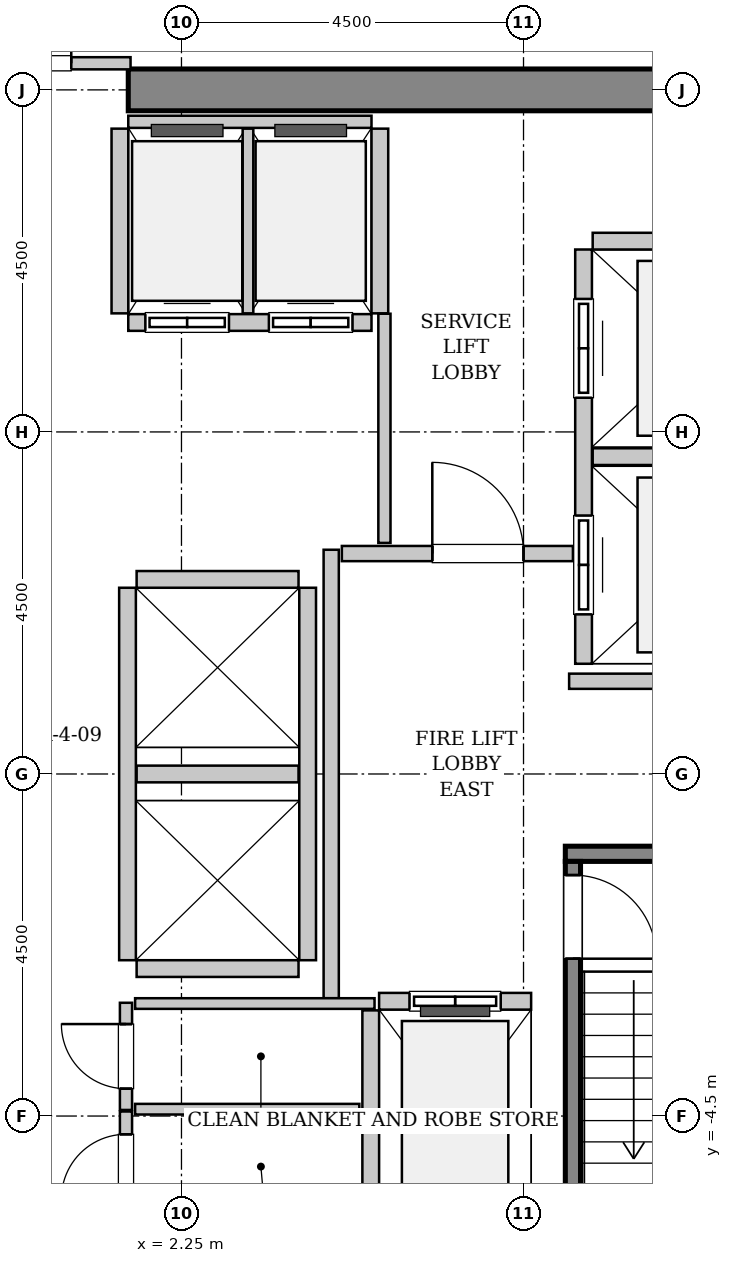
"""IFC4 building model, lengths in metres.
Left out: names, types, materials, properties, quantities, classifications, styles, units other than length and angle.
Written with IfcOpenShell. Run it as: python <this file> out.ifc"""

import sys

from ifc_helpers import new_model, si_unit, direction, frame, frame_2d, origin, place, context, subcontext, project, spatial, rectangle, extrude, source, transform, mapped, element, fill, save


model = new_model("IFC4")
c1 = context("Model", 3, precision=1e-05, world=origin(), true_north=direction((0.0, 1.0)))
c2 = subcontext(c1, "Body", "Model", "MODEL_VIEW")
j1 = project(units=[si_unit("LENGTHUNIT", "METRE"), si_unit("PLANEANGLEUNIT", "RADIAN")], contexts=[c1])
p1 = place(None, origin())
s1 = spatial("IfcSite", under=j1, at=p1, CompositionType="ELEMENT")
p2 = place(p1, origin())
s2 = spatial("IfcBuilding", under=s1, at=p2, CompositionType="ELEMENT")
p3 = place(p2, frame((0.0, 0.0, 136.4)))
s3 = spatial("IfcBuildingStorey", under=s2, at=p3, CompositionType="ELEMENT", Elevation=136.4)
m1 = source(origin(), c2, "Body", "SweptSolid", [
    extrude(rectangle(XDim=9.975, YDim=0.55, at=frame_2d((4.987, 0.0))), origin(), (0.0, 0.0, 1.0), 3.8),
])
p4 = place(p3, frame((1.55, 9.0, 0.0), z_axis=(0.0, 0.0, 1.0), x_axis=(1.0, 0.0, 0.0)))
e1 = element("IfcWall", 1, at=p4, inside=s3, PredefinedType="SHEAR", context=c2, shape_type="MappedRepresentation", body=[
    mapped(m1, transform((0.0, 0.0, 0.0), x_axis=(1.0, 0.0, 0.0), y_axis=(0.0, 1.0, 0.0), z_axis=(0.0, 0.0, 1.0), scale=1.0)),
])
m2 = source(origin(), c2, "Body", "SweptSolid", [
    extrude(rectangle(XDim=3.4, YDim=0.2, at=frame_2d((1.7, 0.0))), origin(), (0.0, 0.0, 1.0), 3.8),
])
p5 = place(p3, frame((7.3, -1.05, 0.0), z_axis=(0.0, 0.0, 1.0), x_axis=(1.0, 0.0, 0.0)))
e2 = element("IfcWall", 2, at=p5, inside=s3, PredefinedType="SOLIDWALL", context=c2, shape_type="MappedRepresentation", body=[
    mapped(m2, transform((0.0, 0.0, 0.0), x_axis=(1.0, 0.0, 0.0), y_axis=(0.0, 1.0, 0.0), z_axis=(0.0, 0.0, 1.0), scale=1.0)),
])
m3 = source(origin(), c2, "Body", "SweptSolid", [
    extrude(rectangle(XDim=7.1, YDim=0.2, at=frame_2d((3.55, 0.0))), origin(), (0.0, 0.0, 1.0), 3.8),
])
p6 = place(p3, frame((7.4, -1.15, 0.0), z_axis=(0.0, 0.0, 1.0), x_axis=(0.0, -1.0, 0.0)))
e3 = element("IfcWall", 3, at=p6, inside=s3, PredefinedType="SOLIDWALL", context=c2, shape_type="MappedRepresentation", body=[
    mapped(m3, transform((0.0, 0.0, 0.0), x_axis=(1.0, 0.0, 0.0), y_axis=(0.0, 1.0, 0.0), z_axis=(0.0, 0.0, 1.0), scale=1.0)),
])
p7 = place(p6, frame((0.18, 0.0, 0.0)))
e4 = element("IfcOpeningElement", 4, at=p7, cuts=e3, PredefinedType="OPENING", context=c2, shape_type="SweptSolid", body=[
    extrude(rectangle(XDim=1.1, YDim=2.15, at=frame_2d((0.55, 1.075))), frame((0.0, 0.11, 0.0), z_axis=(0.0, -1.0, 0.0), x_axis=(1.0, 0.0, 0.0)), (0.0, 0.0, 1.0), 0.22),
])
m4 = source(origin(), c2, "Body", "SweptSolid", [
    extrude(rectangle(XDim=2.0, YDim=0.22, at=frame_2d((1.0, 0.0))), origin(), (0.0, 0.0, 1.0), 3.535),
])
p8 = place(p3, frame((6.85, -2.99, 0.0), z_axis=(0.0, 0.0, 1.0), x_axis=(-1.0, 0.0, 0.0)))
e5 = element("IfcWall", 5, at=p8, inside=s3, PredefinedType="SOLIDWALL", context=c2, shape_type="MappedRepresentation", body=[
    mapped(m4, transform((0.0, 0.0, 0.0), x_axis=(1.0, 0.0, 0.0), y_axis=(0.0, 1.0, 0.0), z_axis=(0.0, 0.0, 1.0), scale=1.0)),
])
p9 = place(p8, frame((0.4, 0.0, 0.0)))
e6 = element("IfcOpeningElement", 6, at=p9, cuts=e5, PredefinedType="OPENING", context=c2, shape_type="SweptSolid", body=[
    extrude(rectangle(XDim=1.2, YDim=2.2, at=frame_2d((0.6, 1.1))), frame((0.0, 0.12, 0.0), z_axis=(0.0, -1.0, 0.0), x_axis=(1.0, 0.0, 0.0)), (0.0, 0.0, 1.0), 0.24),
])
m5 = source(origin(), c2, "Body", "SweptSolid", [
    extrude(rectangle(XDim=2.68, YDim=0.22, at=frame_2d((1.34, 0.0))), origin(), (0.0, 0.0, 1.0), 3.535),
])
p10 = place(p3, frame((4.74, -3.11, 0.0), z_axis=(0.0, 0.0, 1.0), x_axis=(0.0, -1.0, 0.0)))
e7 = element("IfcWall", 7, at=p10, inside=s3, PredefinedType="SOLIDWALL", context=c2, shape_type="MappedRepresentation", body=[
    mapped(m5, transform((0.0, 0.0, 0.0), x_axis=(1.0, 0.0, 0.0), y_axis=(0.0, 1.0, 0.0), z_axis=(0.0, 0.0, 1.0), scale=1.0)),
])
m6 = source(origin(), c2, "Body", "SweptSolid", [
    extrude(rectangle(XDim=5.45, YDim=0.22, at=frame_2d((2.725, 0.0))), origin(), (0.0, 0.0, 1.0), 3.535),
])
p11 = place(p3, frame((7.54, 6.9, 0.0), z_axis=(0.0, 0.0, 1.0), x_axis=(0.0, -1.0, 0.0)))
e8 = element("IfcWall", 8, at=p11, inside=s3, PredefinedType="SOLIDWALL", context=c2, shape_type="MappedRepresentation", body=[
    mapped(m6, transform((0.0, 0.0, 0.0), x_axis=(1.0, 0.0, 0.0), y_axis=(0.0, 1.0, 0.0), z_axis=(0.0, 0.0, 1.0), scale=1.0)),
])
p12 = place(p11, frame((3.5, 0.0, 0.0)))
e9 = element("IfcOpeningElement", 9, at=p12, cuts=e8, PredefinedType="OPENING", context=c2, shape_type="SweptSolid", body=[
    extrude(rectangle(XDim=1.3, YDim=2.3, at=frame_2d((0.65, 1.15))), frame((0.0, 0.12, 0.0), z_axis=(0.0, -1.0, 0.0), x_axis=(1.0, 0.0, 0.0)), (0.0, 0.0, 1.0), 0.24),
])
p13 = place(p11, frame((0.65, 0.0, 0.0)))
e10 = element("IfcOpeningElement", 10, at=p13, cuts=e8, PredefinedType="OPENING", context=c2, shape_type="SweptSolid", body=[
    extrude(rectangle(XDim=1.3, YDim=2.3, at=frame_2d((0.65, 1.15))), frame((0.0, 0.12, 0.0), z_axis=(0.0, -1.0, 0.0), x_axis=(1.0, 0.0, 0.0)), (0.0, 0.0, 1.0), 0.24),
])
m7 = source(origin(), c2, "Body", "SweptSolid", [
    extrude(rectangle(XDim=2.78, YDim=0.22, at=frame_2d((1.39, 0.0))), origin(), (0.0, 0.0, 1.0), 3.535),
])
for number, where, z_axis, x_axis in (
    (11, (7.66, 4.175, 0.0), (0.0, 0.0, 1.0), (1.0, 0.0, 0.0)),
    (12, (10.44, 7.01, 0.0), (0.0, 0.0, 1.0), (-1.0, 0.0, 0.0)),
):
    element("IfcWall", number, at=place(p3, frame(where, z_axis=z_axis, x_axis=x_axis)), inside=s3, PredefinedType="SOLIDWALL", context=c2, shape_type="MappedRepresentation", body=[
        mapped(m7, transform((0.0, 0.0, 0.0), x_axis=(1.0, 0.0, 0.0), y_axis=(0.0, 1.0, 0.0), z_axis=(0.0, 0.0, 1.0), scale=1.0)),
    ])
m8 = source(origin(), c2, "Body", "SweptSolid", [
    extrude(rectangle(XDim=3.2, YDim=0.22, at=frame_2d((1.6, 0.0))), origin(), (0.0, 0.0, 1.0), 3.535),
])
p14 = place(p3, frame((1.55, 5.94, 0.0), z_axis=(0.0, 0.0, 1.0), x_axis=(1.0, 0.0, 0.0)))
e13 = element("IfcWall", 13, at=p14, inside=s3, PredefinedType="SOLIDWALL", context=c2, shape_type="MappedRepresentation", body=[
    mapped(m8, transform((0.0, 0.0, 0.0), x_axis=(1.0, 0.0, 0.0), y_axis=(0.0, 1.0, 0.0), z_axis=(0.0, 0.0, 1.0), scale=1.0)),
])
p15 = place(p14, frame((0.225, 0.0, 0.0)))
e14 = element("IfcOpeningElement", 14, at=p15, cuts=e13, PredefinedType="OPENING", context=c2, shape_type="SweptSolid", body=[
    extrude(rectangle(XDim=1.1, YDim=2.2, at=frame_2d((0.55, 1.1))), frame((0.0, 0.12, 0.0), z_axis=(0.0, -1.0, 0.0), x_axis=(1.0, 0.0, 0.0)), (0.0, 0.0, 1.0), 0.24),
])
p16 = place(p14, frame((1.85, 0.0, 0.0)))
e15 = element("IfcOpeningElement", 15, at=p16, cuts=e13, PredefinedType="OPENING", context=c2, shape_type="SweptSolid", body=[
    extrude(rectangle(XDim=1.1, YDim=2.2, at=frame_2d((0.55, 1.1))), frame((0.0, 0.12, 0.0), z_axis=(0.0, -1.0, 0.0), x_axis=(1.0, 0.0, 0.0)), (0.0, 0.0, 1.0), 0.24),
])
m9 = source(origin(), c2, "Body", "SweptSolid", [
    extrude(rectangle(XDim=3.2, YDim=0.16, at=frame_2d((1.6, 0.0))), origin(), (0.0, 0.0, 1.0), 2.425),
])
p17 = place(p3, frame((4.75, 8.58, 0.0), z_axis=(0.0, 0.0, 1.0), x_axis=(-1.0, 0.0, 0.0)))
e16 = element("IfcWall", 16, at=p17, inside=s3, PredefinedType="PARTITIONING", context=c2, shape_type="MappedRepresentation", body=[
    mapped(m9, transform((0.0, 0.0, 0.0), x_axis=(1.0, 0.0, 0.0), y_axis=(0.0, 1.0, 0.0), z_axis=(0.0, 0.0, 1.0), scale=1.0)),
])
m10 = source(origin(), c2, "Body", "SweptSolid", [
    extrude(rectangle(XDim=2.43, YDim=0.22, at=frame_2d((1.215, 0.0))), origin(), (0.0, 0.0, 1.0), 3.535),
])
p18 = place(p3, frame((1.44, 8.49, 0.0), z_axis=(0.0, 0.0, 1.0), x_axis=(0.0, -1.0, 0.0)))
e17 = element("IfcWall", 17, at=p18, inside=s3, PredefinedType="SOLIDWALL", context=c2, shape_type="MappedRepresentation", body=[
    mapped(m10, transform((0.0, 0.0, 0.0), x_axis=(1.0, 0.0, 0.0), y_axis=(0.0, 1.0, 0.0), z_axis=(0.0, 0.0, 1.0), scale=1.0)),
])
m11 = source(origin(), c2, "Body", "SweptSolid", [
    extrude(rectangle(XDim=2.43, YDim=0.14, at=frame_2d((1.215, 0.0))), origin(), (0.0, 0.0, 1.0), 3.535),
])
p19 = place(p3, frame((3.125, 6.06, 0.0), z_axis=(0.0, 0.0, 1.0), x_axis=(0.0, 1.0, 0.0)))
e18 = element("IfcWall", 18, at=p19, inside=s3, PredefinedType="PARTITIONING", context=c2, shape_type="MappedRepresentation", body=[
    mapped(m11, transform((0.0, 0.0, 0.0), x_axis=(1.0, 0.0, 0.0), y_axis=(0.0, 1.0, 0.0), z_axis=(0.0, 0.0, 1.0), scale=1.0)),
])
p20 = place(p3, frame((4.86, 6.06, 0.0), z_axis=(0.0, 0.0, 1.0), x_axis=(0.0, 1.0, 0.0)))
e19 = element("IfcWall", 19, at=p20, inside=s3, PredefinedType="SOLIDWALL", context=c2, shape_type="MappedRepresentation", body=[
    mapped(m10, transform((0.0, 0.0, 0.0), x_axis=(1.0, 0.0, 0.0), y_axis=(0.0, 1.0, 0.0), z_axis=(0.0, 0.0, 1.0), scale=1.0)),
])
m12 = source(origin(), c2, "Body", "SweptSolid", [
    extrude(rectangle(XDim=4.9, YDim=0.22, at=frame_2d((2.45, 0.0))), origin(), (0.0, 0.0, 1.0), 3.535),
])
for number, where, z_axis, x_axis in (
    (20, (1.54, 2.45, 0.0), (0.0, 0.0, 1.0), (0.0, -1.0, 0.0)),
    (21, (3.91, -2.45, 0.0), (0.0, 0.0, 1.0), (0.0, 1.0, 0.0)),
):
    element("IfcWall", number, at=place(p3, frame(where, z_axis=z_axis, x_axis=x_axis)), inside=s3, PredefinedType="SOLIDWALL", context=c2, shape_type="MappedRepresentation", body=[
        mapped(m12, transform((0.0, 0.0, 0.0), x_axis=(1.0, 0.0, 0.0), y_axis=(0.0, 1.0, 0.0), z_axis=(0.0, 0.0, 1.0), scale=1.0)),
    ])
m13 = source(origin(), c2, "Body", "SweptSolid", [
    extrude(rectangle(XDim=2.13, YDim=0.22, at=frame_2d((1.065, 0.0))), origin(), (0.0, 0.0, 1.0), 3.535),
])
for number, where, z_axis, x_axis in (
    (22, (1.66, -2.56, 0.0), (0.0, 0.0, 1.0), (1.0, 0.0, 0.0)),
    (23, (1.66, 0.0, 0.0), (0.0, 0.0, 1.0), (1.0, 0.0, 0.0)),
    (24, (3.79, 2.56, 0.0), (0.0, 0.0, 1.0), (-1.0, 0.0, 0.0)),
):
    element("IfcWall", number, at=place(p3, frame(where, z_axis=z_axis, x_axis=x_axis)), inside=s3, PredefinedType="SOLIDWALL", context=c2, shape_type="MappedRepresentation", body=[
        mapped(m13, transform((0.0, 0.0, 0.0), x_axis=(1.0, 0.0, 0.0), y_axis=(0.0, 1.0, 0.0), z_axis=(0.0, 0.0, 1.0), scale=1.0)),
    ])
m14 = source(origin(), c2, "Body", "SweptSolid", [
    extrude(rectangle(XDim=5.9, YDim=0.2, at=frame_2d((2.95, 0.0))), origin(), (0.0, 0.0, 1.0), 3.535),
])
p21 = place(p3, frame((4.22, -2.95, 0.0), z_axis=(0.0, 0.0, 1.0), x_axis=(0.0, 1.0, 0.0)))
e25 = element("IfcWall", 25, at=p21, inside=s3, PredefinedType="PARTITIONING", context=c2, shape_type="MappedRepresentation", body=[
    mapped(m14, transform((0.0, 0.0, 0.0), x_axis=(1.0, 0.0, 0.0), y_axis=(0.0, 1.0, 0.0), z_axis=(0.0, 0.0, 1.0), scale=1.0)),
])
m15 = source(origin(), c2, "Body", "SweptSolid", [
    extrude(rectangle(XDim=3.04, YDim=0.2, at=frame_2d((1.52, 0.0))), origin(), (0.0, 0.0, 1.0), 3.535),
])
p22 = place(p3, frame((4.36, 2.9, 0.0), z_axis=(0.0, 0.0, 1.0), x_axis=(1.0, 0.0, 0.0)))
e26 = element("IfcWall", 26, at=p22, inside=s3, PredefinedType="PARTITIONING", context=c2, shape_type="MappedRepresentation", body=[
    mapped(m15, transform((0.0, 0.0, 0.0), x_axis=(1.0, 0.0, 0.0), y_axis=(0.0, 1.0, 0.0), z_axis=(0.0, 0.0, 1.0), scale=1.0)),
])
p23 = place(p22, frame((1.19, 0.0, 0.0)))
e27 = element("IfcOpeningElement", 27, at=p23, cuts=e26, PredefinedType="OPENING", context=c2, shape_type="SweptSolid", body=[
    extrude(rectangle(XDim=1.2, YDim=2.15, at=frame_2d((0.6, 1.075))), frame((0.0, 0.11, 0.0), z_axis=(0.0, -1.0, 0.0), x_axis=(1.0, 0.0, 0.0)), (0.0, 0.0, 1.0), 0.22),
])
m16 = source(origin(), c2, "Body", "SweptSolid", [
    extrude(rectangle(XDim=4.11, YDim=0.2, at=frame_2d((2.055, 0.0))), origin(), (0.0, 0.0, 1.0), 3.535),
])
p24 = place(p3, frame((7.35, 1.22, 0.0), z_axis=(0.0, 0.0, 1.0), x_axis=(1.0, 0.0, 0.0)))
e28 = element("IfcWall", 28, at=p24, inside=s3, PredefinedType="PARTITIONING", context=c2, shape_type="MappedRepresentation", body=[
    mapped(m16, transform((0.0, 0.0, 0.0), x_axis=(1.0, 0.0, 0.0), y_axis=(0.0, 1.0, 0.0), z_axis=(0.0, 0.0, 1.0), scale=1.0)),
])
m17 = source(origin(), c2, "Body", "SweptSolid", [
    extrude(rectangle(XDim=3.16, YDim=0.16, at=frame_2d((1.58, 0.0))), origin(), (0.0, 0.0, 1.0), 2.425),
])
p25 = place(p3, frame((-1.58, 9.35, 0.0), z_axis=(0.0, 0.0, 1.0), x_axis=(1.0, 0.0, 0.0)))
e29 = element("IfcWall", 29, at=p25, inside=s3, PredefinedType="PARTITIONING", context=c2, shape_type="MappedRepresentation", body=[
    mapped(m17, transform((0.0, 0.0, 0.0), x_axis=(1.0, 0.0, 0.0), y_axis=(0.0, 1.0, 0.0), z_axis=(0.0, 0.0, 1.0), scale=1.0)),
])
p26 = place(p25, frame((0.78, 0.0, 0.0)))
e30 = element("IfcOpeningElement", 30, at=p26, cuts=e29, PredefinedType="OPENING", context=c2, shape_type="SweptSolid", body=[
    extrude(rectangle(XDim=1.6, YDim=2.3, at=frame_2d((0.8, 1.15))), frame((0.0, 0.09, 0.0), z_axis=(0.0, -1.0, 0.0), x_axis=(1.0, 0.0, 0.0)), (0.0, 0.0, 1.0), 0.18),
])
m18 = source(origin(), c2, "Body", "SweptSolid", [
    extrude(rectangle(XDim=3.015, YDim=0.16, at=frame_2d((1.507, 0.0))), origin(), (0.0, 0.0, 1.0), 3.535),
])
p27 = place(p3, frame((4.92, 3.04, 0.0), z_axis=(0.0, 0.0, 1.0), x_axis=(0.0, 1.0, 0.0)))
e31 = element("IfcWall", 31, at=p27, inside=s3, PredefinedType="PARTITIONING", context=c2, shape_type="MappedRepresentation", body=[
    mapped(m18, transform((0.0, 0.0, 0.0), x_axis=(1.0, 0.0, 0.0), y_axis=(0.0, 1.0, 0.0), z_axis=(0.0, 0.0, 1.0), scale=1.0)),
])
m19 = source(origin(), c2, "Body", "SweptSolid", [
    extrude(rectangle(XDim=1.41, YDim=0.16, at=frame_2d((0.705, 0.0))), origin(), (0.0, 0.0, 1.0), 3.535),
])
p28 = place(p3, frame((1.52, -4.42, 0.0), z_axis=(0.0, 0.0, 1.0), x_axis=(0.0, 1.0, 0.0)))
e32 = element("IfcWall", 32, at=p28, inside=s3, PredefinedType="PARTITIONING", context=c2, shape_type="MappedRepresentation", body=[
    mapped(m19, transform((0.0, 0.0, 0.0), x_axis=(1.0, 0.0, 0.0), y_axis=(0.0, 1.0, 0.0), z_axis=(0.0, 0.0, 1.0), scale=1.0)),
])
p29 = place(p28, frame((0.28, 0.0, 0.0)))
e33 = element("IfcOpeningElement", 33, at=p29, cuts=e32, PredefinedType="OPENING", context=c2, shape_type="SweptSolid", body=[
    extrude(rectangle(XDim=0.85, YDim=2.1, at=frame_2d((0.425, 1.05))), frame((0.0, 0.09, 0.0), z_axis=(0.0, -1.0, 0.0), x_axis=(1.0, 0.0, 0.0)), (0.0, 0.0, 1.0), 0.18),
])
m20 = source(origin(), c2, "Body", "SweptSolid", [
    extrude(rectangle(XDim=3.15, YDim=0.14, at=frame_2d((1.575, 0.0))), origin(), (0.0, 0.0, 1.0), 3.535),
])
p30 = place(p3, frame((1.64, -3.02, 0.0), z_axis=(0.0, 0.0, 1.0), x_axis=(1.0, 0.0, 0.0)))
e34 = element("IfcWall", 34, at=p30, inside=s3, PredefinedType="PARTITIONING", context=c2, shape_type="MappedRepresentation", body=[
    mapped(m20, transform((0.0, 0.0, 0.0), x_axis=(1.0, 0.0, 0.0), y_axis=(0.0, 1.0, 0.0), z_axis=(0.0, 0.0, 1.0), scale=1.0)),
])
m21 = source(origin(), c2, "Body", "SweptSolid", [
    extrude(rectangle(XDim=2.95, YDim=0.14, at=frame_2d((1.475, 0.0))), origin(), (0.0, 0.0, 1.0), 3.535),
])
p31 = place(p3, frame((1.64, -4.41, 0.0), z_axis=(0.0, 0.0, 1.0), x_axis=(1.0, 0.0, 0.0)))
e35 = element("IfcWall", 35, at=p31, inside=s3, PredefinedType="PARTITIONING", context=c2, shape_type="MappedRepresentation", body=[
    mapped(m21, transform((0.0, 0.0, 0.0), x_axis=(1.0, 0.0, 0.0), y_axis=(0.0, 1.0, 0.0), z_axis=(0.0, 0.0, 1.0), scale=1.0)),
])
m22 = source(origin(), c2, "Body", "SweptSolid", [
    extrude(rectangle(XDim=1.45, YDim=0.16, at=frame_2d((0.725, 0.0))), origin(), (0.0, 0.0, 1.0), 3.535),
])
p32 = place(p3, frame((1.52, -5.89, 0.0), z_axis=(0.0, 0.0, 1.0), x_axis=(0.0, 1.0, 0.0)))
e36 = element("IfcWall", 36, at=p32, inside=s3, PredefinedType="PARTITIONING", context=c2, shape_type="MappedRepresentation", body=[
    mapped(m22, transform((0.0, 0.0, 0.0), x_axis=(1.0, 0.0, 0.0), y_axis=(0.0, 1.0, 0.0), z_axis=(0.0, 0.0, 1.0), scale=1.0)),
])
p33 = place(p32, frame((0.3, 0.0, 0.0)))
e37 = element("IfcOpeningElement", 37, at=p33, cuts=e36, PredefinedType="OPENING", context=c2, shape_type="SweptSolid", body=[
    extrude(rectangle(XDim=0.85, YDim=2.1, at=frame_2d((0.425, 1.05))), frame((0.0, 0.09, 0.0), z_axis=(0.0, -1.0, 0.0), x_axis=(1.0, 0.0, 0.0)), (0.0, 0.0, 1.0), 0.18),
])
m23 = source(origin(), c2, "Body", "SweptSolid", [
    extrude(rectangle(XDim=1.1, YDim=2.15, at=frame_2d((0.55, 1.075))), frame((0.0, 0.025, 0.0), z_axis=(0.0, -1.0, 0.0), x_axis=(1.0, 0.0, 0.0)), (0.0, 0.0, 1.0), 0.05),
])
p34 = place(p7, origin())
e38 = element("IfcDoor", 38, at=p34, inside=s3, OperationType="SINGLE_SWING_RIGHT", PredefinedType="DOOR", context=c2, shape_type="MappedRepresentation", body=[
    mapped(m23, transform((0.0, 0.0, 0.0), x_axis=(1.0, 0.0, 0.0), y_axis=(0.0, 1.0, 0.0), z_axis=(0.0, 0.0, 1.0), scale=1.0)),
])
fill(e4, e38)
m24 = source(origin(), c2, "Body", "SweptSolid", [
    extrude(rectangle(XDim=1.2, YDim=2.2, at=frame_2d((0.6, 1.1))), frame((0.0, 0.025, 0.0), z_axis=(0.0, -1.0, 0.0), x_axis=(1.0, 0.0, 0.0)), (0.0, 0.0, 1.0), 0.05),
])
p35 = place(p9, origin())
e39 = element("IfcDoor", 39, at=p35, inside=s3, OperationType="SLIDING_TO_LEFT", PredefinedType="DOOR", context=c2, shape_type="MappedRepresentation", body=[
    mapped(m24, transform((0.0, 0.0, 0.0), x_axis=(1.0, 0.0, 0.0), y_axis=(0.0, 1.0, 0.0), z_axis=(0.0, 0.0, 1.0), scale=1.0)),
])
fill(e6, e39)
m25 = source(origin(), c2, "Body", "SweptSolid", [
    extrude(rectangle(XDim=1.3, YDim=2.3, at=frame_2d((0.65, 1.15))), frame((0.0, 0.025, 0.0), z_axis=(0.0, -1.0, 0.0), x_axis=(1.0, 0.0, 0.0)), (0.0, 0.0, 1.0), 0.05),
])
p36 = place(p12, origin())
e40 = element("IfcDoor", 40, at=p36, inside=s3, OperationType="SLIDING_TO_RIGHT", PredefinedType="DOOR", context=c2, shape_type="MappedRepresentation", body=[
    mapped(m25, transform((0.0, 0.0, 0.0), x_axis=(1.0, 0.0, 0.0), y_axis=(0.0, 1.0, 0.0), z_axis=(0.0, 0.0, 1.0), scale=1.0)),
])
fill(e9, e40)
p37 = place(p13, origin())
e41 = element("IfcDoor", 41, at=p37, inside=s3, OperationType="SLIDING_TO_RIGHT", PredefinedType="DOOR", context=c2, shape_type="MappedRepresentation", body=[
    mapped(m25, transform((0.0, 0.0, 0.0), x_axis=(1.0, 0.0, 0.0), y_axis=(0.0, 1.0, 0.0), z_axis=(0.0, 0.0, 1.0), scale=1.0)),
])
fill(e10, e41)
m26 = source(origin(), c2, "Body", "SweptSolid", [
    extrude(rectangle(XDim=1.1, YDim=2.2, at=frame_2d((0.55, 1.1))), frame((0.0, 0.025, 0.0), z_axis=(0.0, -1.0, 0.0), x_axis=(1.0, 0.0, 0.0)), (0.0, 0.0, 1.0), 0.05),
])
p38 = place(p15, origin())
e42 = element("IfcDoor", 42, at=p38, inside=s3, OperationType="DOUBLE_DOOR_SLIDING", PredefinedType="DOOR", context=c2, shape_type="MappedRepresentation", body=[
    mapped(m26, transform((0.0, 0.0, 0.0), x_axis=(1.0, 0.0, 0.0), y_axis=(0.0, 1.0, 0.0), z_axis=(0.0, 0.0, 1.0), scale=1.0)),
])
fill(e14, e42)
p39 = place(p16, origin())
e43 = element("IfcDoor", 43, at=p39, inside=s3, OperationType="DOUBLE_DOOR_SLIDING", PredefinedType="DOOR", context=c2, shape_type="MappedRepresentation", body=[
    mapped(m26, transform((0.0, 0.0, 0.0), x_axis=(1.0, 0.0, 0.0), y_axis=(0.0, 1.0, 0.0), z_axis=(0.0, 0.0, 1.0), scale=1.0)),
])
fill(e15, e43)
m27 = source(origin(), c2, "Body", "SweptSolid", [
    extrude(rectangle(XDim=1.2, YDim=2.15, at=frame_2d((0.6, 1.075))), frame((0.0, 0.025, 0.0), z_axis=(0.0, -1.0, 0.0), x_axis=(1.0, 0.0, 0.0)), (0.0, 0.0, 1.0), 0.05),
])
p40 = place(p23, origin())
e44 = element("IfcDoor", 44, at=p40, inside=s3, OperationType="SINGLE_SWING_LEFT", PredefinedType="DOOR", context=c2, shape_type="MappedRepresentation", body=[
    mapped(m27, transform((0.0, 0.0, 0.0), x_axis=(1.0, 0.0, 0.0), y_axis=(0.0, 1.0, 0.0), z_axis=(0.0, 0.0, 1.0), scale=1.0)),
])
fill(e27, e44)
m28 = source(origin(), c2, "Body", "SweptSolid", [
    extrude(rectangle(XDim=1.6, YDim=2.3, at=frame_2d((0.8, 1.15))), frame((0.0, 0.025, 0.0), z_axis=(0.0, -1.0, 0.0), x_axis=(1.0, 0.0, 0.0)), (0.0, 0.0, 1.0), 0.05),
])
p41 = place(p26, origin())
e45 = element("IfcDoor", 45, at=p41, inside=s3, OperationType="DOUBLE_DOOR_SINGLE_SWING", PredefinedType="DOOR", context=c2, shape_type="MappedRepresentation", body=[
    mapped(m28, transform((0.0, 0.0, 0.0), x_axis=(1.0, 0.0, 0.0), y_axis=(0.0, 1.0, 0.0), z_axis=(0.0, 0.0, 1.0), scale=1.0)),
])
fill(e30, e45)
m29 = source(origin(), c2, "Body", "SweptSolid", [
    extrude(rectangle(XDim=0.85, YDim=2.1, at=frame_2d((0.425, 1.05))), frame((0.0, 0.025, 0.0), z_axis=(0.0, -1.0, 0.0), x_axis=(1.0, 0.0, 0.0)), (0.0, 0.0, 1.0), 0.05),
])
p42 = place(p29, origin())
e46 = element("IfcDoor", 46, at=p42, inside=s3, OperationType="SINGLE_SWING_RIGHT", PredefinedType="DOOR", context=c2, shape_type="MappedRepresentation", body=[
    mapped(m29, transform((0.0, 0.0, 0.0), x_axis=(1.0, 0.0, 0.0), y_axis=(0.0, 1.0, 0.0), z_axis=(0.0, 0.0, 1.0), scale=1.0)),
])
fill(e33, e46)
p43 = place(p33, origin())
e47 = element("IfcDoor", 47, at=p43, inside=s3, OperationType="SINGLE_SWING_LEFT", PredefinedType="DOOR", context=c2, shape_type="MappedRepresentation", body=[
    mapped(m29, transform((0.0, 0.0, 0.0), x_axis=(1.0, 0.0, 0.0), y_axis=(0.0, 1.0, 0.0), z_axis=(0.0, 0.0, 1.0), scale=1.0)),
])
fill(e37, e47)
save(model, sys.argv[1])
